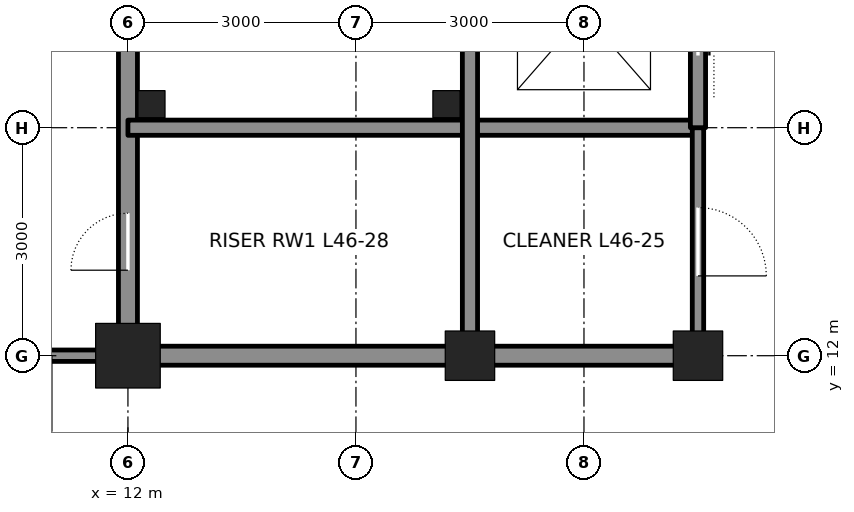
"""IFC4 building model, lengths in metres.
Left out: names, types, materials, properties, quantities, classifications, styles, units other than length and angle.
Written with IfcOpenShell. Run it as: python <this file> out.ifc"""

import sys

from ifc_helpers import new_model, si_unit, direction, frame, frame_2d, origin, origin_2d, place, context, subcontext, project, spatial, rectangle, hollow_rectangle, extrude, element, fill, save


model = new_model("IFC4")
c1 = context("Model", 3, precision=1e-05, world=origin(), true_north=direction((0.0, 1.0)))
c2 = subcontext(c1, "Body", "Model", "MODEL_VIEW")
j1 = project(units=[si_unit("LENGTHUNIT", "METRE"), si_unit("PLANEANGLEUNIT", "RADIAN")], contexts=[c1])
p1 = place(None, origin())
s1 = spatial("IfcSite", under=j1, at=p1, CompositionType="ELEMENT")
p2 = place(p1, origin())
s2 = spatial("IfcBuilding", under=s1, at=p2, CompositionType="ELEMENT")
p3 = place(p2, frame((0.0, 0.0, 209.7)))
s3 = spatial("IfcBuildingStorey", under=s2, at=p3, CompositionType="ELEMENT", Elevation=209.7)
p4 = place(p3, frame((12.0, 12.0, 0.0), z_axis=(0.0, 0.0, 1.0), x_axis=(1.0, 0.0, 0.0)))
e1 = element("IfcColumn", 1, at=p4, inside=s3, PredefinedType="COLUMN", context=c2, shape_type="SweptSolid", body=[
    extrude(hollow_rectangle(XDim=0.85, YDim=0.85, WallThickness=0.085, at=origin_2d()), origin(), (0.0, 0.0, 1.0), 4.2),
])
for number, where, z_axis, x_axis in (
    (2, (16.5, 12.0, 0.0), (0.0, 0.0, 1.0), (1.0, 0.0, 0.0)),
    (3, (19.5, 12.0, 0.0), (0.0, 0.0, 1.0), (1.0, 0.0, 0.0)),
):
    element("IfcColumn", number, at=place(p3, frame(where, z_axis=z_axis, x_axis=x_axis)), inside=s3, PredefinedType="COLUMN", context=c2, shape_type="SweptSolid", body=[
        extrude(hollow_rectangle(XDim=0.65, YDim=0.65, WallThickness=0.065, at=origin_2d()), origin(), (0.0, 0.0, 1.0), 4.2),
    ])
p5 = place(p3, frame((12.0, 12.25, 0.0), z_axis=(0.0, 0.0, 1.0), x_axis=(0.0, 1.0, 0.0)))
e4 = element("IfcWall", 4, at=p5, inside=s3, PredefinedType="SOLIDWALL", context=c2, shape_type="SweptSolid", body=[
    extrude(rectangle(XDim=8.5, YDim=0.25, at=frame_2d((4.25, 0.0))), origin(), (0.0, 0.0, 1.0), 3.113),
])
p6 = place(p5, frame((0.875, 0.0, 0.0)))
e5 = element("IfcOpeningElement", 5, at=p6, cuts=e4, PredefinedType="OPENING", context=c2, shape_type="SweptSolid", body=[
    extrude(rectangle(XDim=0.75, YDim=2.1, at=frame_2d((0.375, 1.05))), frame((0.0, 0.135, 0.0), z_axis=(0.0, -1.0, 0.0), x_axis=(1.0, 0.0, 0.0)), (0.0, 0.0, 1.0), 0.27),
])
p7 = place(p3, frame((12.25, 12.0, 0.0), z_axis=(0.0, 0.0, 1.0), x_axis=(1.0, 0.0, 0.0)))
e6 = element("IfcWall", 6, at=p7, inside=s3, PredefinedType="SOLIDWALL", context=c2, shape_type="SweptSolid", body=[
    extrude(rectangle(XDim=4.0, YDim=0.25, at=frame_2d((2.0, 0.0))), origin(), (0.0, 0.0, 1.0), 3.182),
])
p8 = place(p3, frame((16.75, 12.0, 0.0), z_axis=(0.0, 0.0, 1.0), x_axis=(1.0, 0.0, 0.0)))
e7 = element("IfcWall", 7, at=p8, inside=s3, PredefinedType="SOLIDWALL", context=c2, shape_type="SweptSolid", body=[
    extrude(rectangle(XDim=2.5, YDim=0.25, at=frame_2d((1.25, 0.0))), origin(), (0.0, 0.0, 1.0), 3.182),
])
p9 = place(p3, frame((12.0, 15.0, 0.0), z_axis=(0.0, 0.0, 1.0), x_axis=(1.0, 0.0, 0.0)))
e8 = element("IfcWall", 8, at=p9, inside=s3, PredefinedType="SOLIDWALL", context=c2, shape_type="SweptSolid", body=[
    extrude(rectangle(XDim=7.5, YDim=0.2, at=frame_2d((3.75, 0.0))), origin(), (0.0, 0.0, 1.0), 4.04),
])
p10 = place(p3, frame((16.5, 12.25, 0.0), z_axis=(0.0, 0.0, 1.0), x_axis=(0.0, 1.0, 0.0)))
e9 = element("IfcWall", 9, at=p10, inside=s3, PredefinedType="SOLIDWALL", context=c2, shape_type="SweptSolid", body=[
    extrude(rectangle(XDim=8.5, YDim=0.2, at=frame_2d((4.25, 0.0))), origin(), (0.0, 0.0, 1.0), 3.113),
])
p11 = place(p3, frame((19.5, 12.25, 0.0), z_axis=(0.0, 0.0, 1.0), x_axis=(0.0, 1.0, 0.0)))
e10 = element("IfcWall", 10, at=p11, inside=s3, PredefinedType="PARTITIONING", context=c2, shape_type="SweptSolid", body=[
    extrude(rectangle(XDim=2.75, YDim=0.15, at=frame_2d((1.375, 0.0))), origin(), (0.0, 0.0, 1.0), 3.065),
])
p12 = place(p11, frame((0.8, 0.0, 0.0)))
e11 = element("IfcOpeningElement", 11, at=p12, cuts=e10, PredefinedType="OPENING", context=c2, shape_type="SweptSolid", body=[
    extrude(rectangle(XDim=0.9, YDim=2.1, at=frame_2d((0.45, 1.05))), frame((0.0, 0.085, 0.0), z_axis=(0.0, -1.0, 0.0), x_axis=(1.0, 0.0, 0.0)), (0.0, 0.0, 1.0), 0.17),
])
p13 = place(p3, frame((19.5, 15.0, 0.0), z_axis=(0.0, 0.0, 1.0), x_axis=(0.0, 1.0, 0.0)))
e12 = element("IfcWall", 12, at=p13, inside=s3, PredefinedType="SOLIDWALL", context=c2, shape_type="SweptSolid", body=[
    extrude(rectangle(XDim=12.0, YDim=0.2, at=frame_2d((6.0, 0.0))), origin(), (0.0, 0.0, 1.0), 3.065),
])
p14 = place(p13, frame((0.95, 0.0, 0.0)))
e13 = element("IfcOpeningElement", 13, at=p14, cuts=e12, PredefinedType="OPENING", context=c2, shape_type="SweptSolid", body=[
    extrude(rectangle(XDim=1.1, YDim=2.1, at=frame_2d((0.55, 1.05))), frame((0.0, 0.11, 0.0), z_axis=(0.0, -1.0, 0.0), x_axis=(1.0, 0.0, 0.0)), (0.0, 0.0, 1.0), 0.22),
])
p15 = place(p13, frame((3.95, 0.0, 0.0)))
e14 = element("IfcOpeningElement", 14, at=p15, cuts=e12, PredefinedType="OPENING", context=c2, shape_type="SweptSolid", body=[
    extrude(rectangle(XDim=1.1, YDim=2.1, at=frame_2d((0.55, 1.05))), frame((0.0, 0.11, 0.0), z_axis=(0.0, -1.0, 0.0), x_axis=(1.0, 0.0, 0.0)), (0.0, 0.0, 1.0), 0.22),
])
p16 = place(p13, frame((6.95, 0.0, 0.0)))
e15 = element("IfcOpeningElement", 15, at=p16, cuts=e12, PredefinedType="OPENING", context=c2, shape_type="SweptSolid", body=[
    extrude(rectangle(XDim=1.1, YDim=2.1, at=frame_2d((0.55, 1.05))), frame((0.0, 0.11, 0.0), z_axis=(0.0, -1.0, 0.0), x_axis=(1.0, 0.0, 0.0)), (0.0, 0.0, 1.0), 0.22),
])
p17 = place(p13, frame((9.95, 0.0, 0.0)))
e16 = element("IfcOpeningElement", 16, at=p17, cuts=e12, PredefinedType="OPENING", context=c2, shape_type="SweptSolid", body=[
    extrude(rectangle(XDim=1.1, YDim=2.1, at=frame_2d((0.55, 1.05))), frame((0.0, 0.11, 0.0), z_axis=(0.0, -1.0, 0.0), x_axis=(1.0, 0.0, 0.0)), (0.0, 0.0, 1.0), 0.22),
])
p18 = place(p3, frame((9.0, 12.0, 0.0), z_axis=(0.0, 0.0, 1.0), x_axis=(1.0, 0.0, 0.0)))
e17 = element("IfcWall", 17, at=p18, inside=s3, PredefinedType="PARTITIONING", context=c2, shape_type="SweptSolid", body=[
    extrude(rectangle(XDim=3.0, YDim=0.15, at=frame_2d((1.5, 0.0))), origin(), (0.0, 0.0, 1.0), 3.271),
])
p19 = place(p18, frame((1.0, 0.0, 0.0)))
e18 = element("IfcOpeningElement", 18, at=p19, cuts=e17, PredefinedType="OPENING", context=c2, shape_type="SweptSolid", body=[
    extrude(rectangle(XDim=1.0, YDim=2.4, at=frame_2d((0.5, 1.2))), frame((0.0, 0.085, 0.0), z_axis=(0.0, -1.0, 0.0), x_axis=(1.0, 0.0, 0.0)), (0.0, 0.0, 1.0), 0.17),
])
for number, where, z_axis, x_axis in (
    (19, (12.31, 15.31, 0.0), (0.0, 0.0, 1.0), (1.0, 0.0, 0.0)),
    (20, (16.19, 15.31, 0.0), (0.0, 0.0, 1.0), (1.0, 0.0, 0.0)),
):
    element("IfcColumn", number, at=place(p3, frame(where, z_axis=z_axis, x_axis=x_axis)), inside=s3, PredefinedType="COLUMN", context=c2, shape_type="SweptSolid", body=[
        extrude(hollow_rectangle(XDim=0.356, YDim=0.356, WallThickness=0.009, at=origin_2d()), origin(), (0.0, 0.0, 1.0), 4.2),
    ])
p20 = place(p6, origin())
e21 = element("IfcDoor", 21, at=p20, inside=s3, OperationType="SINGLE_SWING_LEFT", PredefinedType="DOOR", context=c2, shape_type="SweptSolid", body=[
    extrude(rectangle(XDim=0.75, YDim=2.1, at=frame_2d((0.375, 1.05))), frame((0.0, 0.025, 0.0), z_axis=(0.0, -1.0, 0.0), x_axis=(1.0, 0.0, 0.0)), (0.0, 0.0, 1.0), 0.05),
])
fill(e5, e21)
p21 = place(p12, frame((0.9, 0.0, 0.0), z_axis=(0.0, 0.0, 1.0), x_axis=(-1.0, 0.0, 0.0)))
e22 = element("IfcDoor", 22, at=p21, inside=s3, OperationType="SINGLE_SWING_RIGHT", PredefinedType="DOOR", context=c2, shape_type="SweptSolid", body=[
    extrude(rectangle(XDim=0.9, YDim=2.1, at=frame_2d((0.45, 1.05))), frame((0.0, 0.025, 0.0), z_axis=(0.0, -1.0, 0.0), x_axis=(1.0, 0.0, 0.0)), (0.0, 0.0, 1.0), 0.05),
])
fill(e11, e22)
p22 = place(p14, origin())
e23 = element("IfcDoor", 23, at=p22, inside=s3, OperationType="DOUBLE_DOOR_SLIDING", PredefinedType="DOOR", context=c2, shape_type="SweptSolid", body=[
    extrude(rectangle(XDim=1.1, YDim=2.1, at=frame_2d((0.55, 1.05))), frame((0.0, 0.025, 0.0), z_axis=(0.0, -1.0, 0.0), x_axis=(1.0, 0.0, 0.0)), (0.0, 0.0, 1.0), 0.05),
])
fill(e13, e23)
save(model, sys.argv[1])
